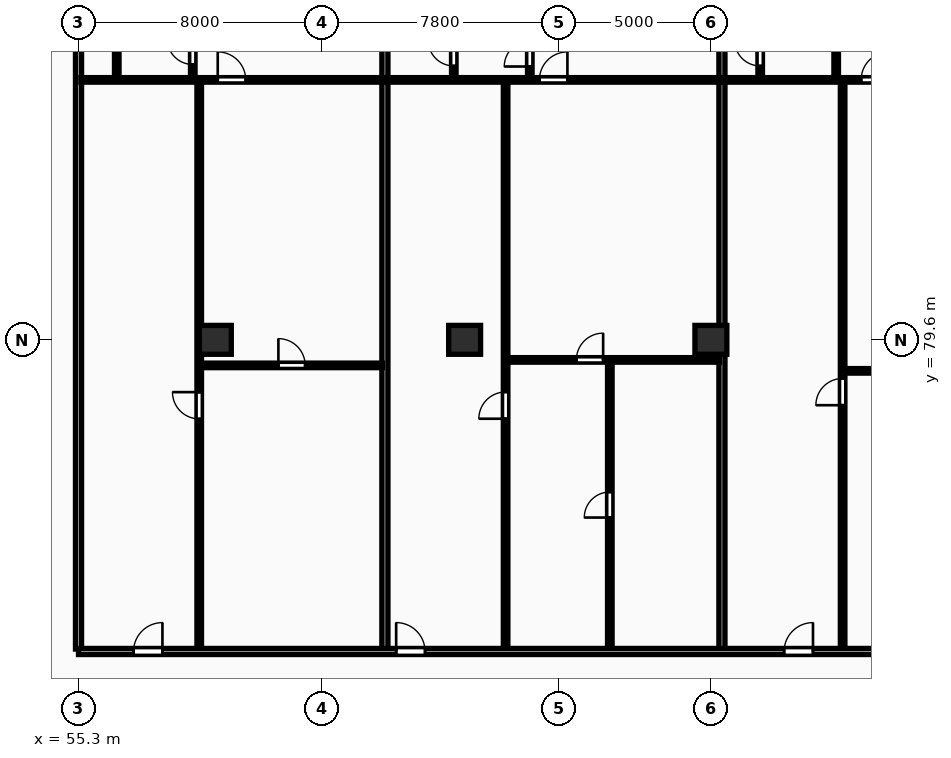
"""IFC4 building model, lengths in metres.
Left out: names, types, materials, properties, quantities, classifications, styles, units other than length and angle.
Written with IfcOpenShell. Run it as: python <this file> out.ifc"""

import sys

from ifc_helpers import new_model, si_unit, direction, frame, frame_2d, origin, origin_2d, place, context, subcontext, project, spatial, rectangle, extrude, element, fill, save


model = new_model("IFC4")
c1 = context("Model", 3, precision=1e-05, world=origin(), true_north=direction((0.0, 1.0)))
c2 = subcontext(c1, "Body", "Model", "MODEL_VIEW")
j1 = project(units=[si_unit("LENGTHUNIT", "METRE"), si_unit("PLANEANGLEUNIT", "RADIAN")], contexts=[c1])
p1 = place(None, origin())
s1 = spatial("IfcSite", under=j1, at=p1, CompositionType="ELEMENT")
p2 = place(p1, origin())
s2 = spatial("IfcBuilding", under=s1, at=p2, CompositionType="ELEMENT")
p3 = place(p2, frame((0.0, 0.0, 24.0)))
s3 = spatial("IfcBuildingStorey", under=s2, at=p3, CompositionType="ELEMENT", Elevation=24.0)
for number, where, z_axis, x_axis in (
    (1, (59.8, 79.6, 0.0), (0.0, 0.0, 1.0), (1.0, 0.0, 0.0)),
    (2, (68.0, 79.6, 0.0), (0.0, 0.0, 1.0), (1.0, 0.0, 0.0)),
    (3, (76.1, 79.6, 0.0), (0.0, 0.0, 1.0), (1.0, 0.0, 0.0)),
):
    element("IfcColumn", number, at=place(p3, frame(where, z_axis=z_axis, x_axis=x_axis)), inside=s3, PredefinedType="COLUMN", context=c2, shape_type="SweptSolid", body=[
        extrude(rectangle(XDim=1.05, YDim=0.95, at=origin_2d()), origin(), (0.0, 0.0, 1.0), 3.25),
    ])
for number, where, z_axis, x_axis in (
    (4, (55.3, 69.43, 0.0), (0.0, 0.0, 1.0), (0.0, 1.0, 0.0)),
    (5, (65.378, 69.43, 0.0), (0.0, 0.0, 1.0), (0.0, 1.0, 0.0)),
):
    element("IfcWall", number, at=place(p3, frame(where, z_axis=z_axis, x_axis=x_axis)), inside=s3, PredefinedType="PARTITIONING", context=c2, shape_type="SweptSolid", body=[
        extrude(rectangle(XDim=29.07, YDim=0.2, at=frame_2d((14.535, 0.0))), origin(), (0.0, 0.0, 1.0), 2.97),
    ])
p4 = place(p3, frame((59.33, 78.76, 0.0), z_axis=(0.0, 0.0, 1.0), x_axis=(1.0, 0.0, 0.0)))
e6 = element("IfcWall", 6, at=p4, inside=s3, PredefinedType="PARTITIONING", context=c2, shape_type="SweptSolid", body=[
    extrude(rectangle(XDim=5.968, YDim=0.15, at=frame_2d((2.984, 0.0))), origin(), (0.0, 0.0, 1.0), 2.97),
])
p5 = place(p4, frame((2.544, 0.0, 0.0)))
e7 = element("IfcOpeningElement", 7, at=p5, cuts=e6, PredefinedType="OPENING", context=c2, shape_type="SweptSolid", body=[
    extrude(rectangle(XDim=0.88, YDim=2.06, at=frame_2d((0.44, 1.03))), frame((0.0, 0.085, 0.0), z_axis=(0.0, -1.0, 0.0), x_axis=(1.0, 0.0, 0.0)), (0.0, 0.0, 1.0), 0.17),
])
p6 = place(p3, frame((59.27, 69.41, 0.0), z_axis=(0.0, 0.0, 1.0), x_axis=(0.0, 1.0, 0.0)))
e8 = element("IfcWall", 8, at=p6, inside=s3, PredefinedType="PARTITIONING", context=c2, shape_type="SweptSolid", body=[
    extrude(rectangle(XDim=18.7, YDim=0.15, at=frame_2d((9.35, 0.0))), origin(), (0.0, 0.0, 1.0), 2.97),
])
p7 = place(p6, frame((7.59, 0.0, 0.0)))
e9 = element("IfcOpeningElement", 9, at=p7, cuts=e8, PredefinedType="OPENING", context=c2, shape_type="SweptSolid", body=[
    extrude(rectangle(XDim=0.88, YDim=2.06, at=frame_2d((0.44, 1.03))), frame((0.0, 0.085, 0.0), z_axis=(0.0, -1.0, 0.0), x_axis=(1.0, 0.0, 0.0)), (0.0, 0.0, 1.0), 0.17),
])
p8 = place(p3, frame((56.558, 88.19, 0.0), z_axis=(0.0, 0.0, 1.0), x_axis=(0.0, 1.0, 0.0)))
e10 = element("IfcWall", 10, at=p8, inside=s3, PredefinedType="PARTITIONING", context=c2, shape_type="SweptSolid", body=[
    extrude(rectangle(XDim=5.0, YDim=0.15, at=frame_2d((2.5, 0.0))), origin(), (0.0, 0.0, 1.0), 2.97),
])
p9 = place(p8, frame((2.08, 0.0, 0.0)))
e11 = element("IfcOpeningElement", 11, at=p9, cuts=e10, PredefinedType="OPENING", context=c2, shape_type="SweptSolid", body=[
    extrude(rectangle(XDim=0.84, YDim=2.04, at=frame_2d((0.42, 1.02))), frame((0.0, 0.085, 0.0), z_axis=(0.0, -1.0, 0.0), x_axis=(1.0, 0.0, 0.0)), (0.0, 0.0, 1.0), 0.17),
])
p10 = place(p3, frame((59.058, 88.19, 0.0), z_axis=(0.0, 0.0, 1.0), x_axis=(0.0, 1.0, 0.0)))
e12 = element("IfcWall", 12, at=p10, inside=s3, PredefinedType="PARTITIONING", context=c2, shape_type="SweptSolid", body=[
    extrude(rectangle(XDim=5.0, YDim=0.15, at=frame_2d((2.5, 0.0))), origin(), (0.0, 0.0, 1.0), 2.97),
])
p11 = place(p10, frame((0.467, 0.0, 0.0)))
e13 = element("IfcOpeningElement", 13, at=p11, cuts=e12, PredefinedType="OPENING", context=c2, shape_type="SweptSolid", body=[
    extrude(rectangle(XDim=0.84, YDim=2.04, at=frame_2d((0.42, 1.02))), frame((0.0, 0.085, 0.0), z_axis=(0.0, -1.0, 0.0), x_axis=(1.0, 0.0, 0.0)), (0.0, 0.0, 1.0), 0.17),
])
p12 = place(p3, frame((55.38, 88.15, 0.0), z_axis=(0.0, 0.0, 1.0), x_axis=(1.0, 0.0, 0.0)))
e14 = element("IfcWall", 14, at=p12, inside=s3, PredefinedType="PARTITIONING", context=c2, shape_type="SweptSolid", body=[
    extrude(rectangle(XDim=9.918, YDim=0.15, at=frame_2d((4.959, 0.0))), origin(), (0.0, 0.0, 1.0), 2.97),
])
p13 = place(p12, frame((4.499, 0.0, 0.0)))
e15 = element("IfcOpeningElement", 15, at=p13, cuts=e14, PredefinedType="OPENING", context=c2, shape_type="SweptSolid", body=[
    extrude(rectangle(XDim=0.92, YDim=2.08, at=frame_2d((0.46, 1.04))), frame((0.0, 0.085, 0.0), z_axis=(0.0, -1.0, 0.0), x_axis=(1.0, 0.0, 0.0)), (0.0, 0.0, 1.0), 0.17),
])
p14 = place(p3, frame((76.464, 69.43, 0.0), z_axis=(0.0, 0.0, 1.0), x_axis=(0.0, 1.0, 0.0)))
e16 = element("IfcWall", 16, at=p14, inside=s3, PredefinedType="PARTITIONING", context=c2, shape_type="SweptSolid", body=[
    extrude(rectangle(XDim=29.07, YDim=0.2, at=frame_2d((14.535, 0.0))), origin(), (0.0, 0.0, 1.0), 2.22),
])
p15 = place(p3, frame((72.776, 69.41, 0.0), z_axis=(0.0, 0.0, 1.0), x_axis=(0.0, 1.0, 0.0)))
e17 = element("IfcWall", 17, at=p15, inside=s3, PredefinedType="PARTITIONING", context=c2, shape_type="SweptSolid", body=[
    extrude(rectangle(XDim=9.53, YDim=0.15, at=frame_2d((4.765, 0.0))), origin(), (0.0, 0.0, 1.0), 2.97),
])
p16 = place(p15, frame((4.345, 0.0, 0.0)))
e18 = element("IfcOpeningElement", 18, at=p16, cuts=e17, PredefinedType="OPENING", context=c2, shape_type="SweptSolid", body=[
    extrude(rectangle(XDim=0.84, YDim=2.04, at=frame_2d((0.42, 1.02))), frame((0.0, 0.085, 0.0), z_axis=(0.0, -1.0, 0.0), x_axis=(1.0, 0.0, 0.0)), (0.0, 0.0, 1.0), 0.17),
])
p17 = place(p3, frame((69.408, 78.94, 0.0), z_axis=(0.0, 0.0, 1.0), x_axis=(1.0, 0.0, 0.0)))
e19 = element("IfcWall", 19, at=p17, inside=s3, PredefinedType="PARTITIONING", context=c2, shape_type="SweptSolid", body=[
    extrude(rectangle(XDim=6.976, YDim=0.15, at=frame_2d((3.488, 0.0))), origin(), (0.0, 0.0, 1.0), 2.97),
])
p18 = place(p17, frame((2.268, 0.0, 0.0)))
e20 = element("IfcOpeningElement", 20, at=p18, cuts=e19, PredefinedType="OPENING", context=c2, shape_type="SweptSolid", body=[
    extrude(rectangle(XDim=0.88, YDim=2.06, at=frame_2d((0.44, 1.03))), frame((0.0, 0.085, 0.0), z_axis=(0.0, -1.0, 0.0), x_axis=(1.0, 0.0, 0.0)), (0.0, 0.0, 1.0), 0.17),
])
p19 = place(p3, frame((69.348, 69.41, 0.0), z_axis=(0.0, 0.0, 1.0), x_axis=(0.0, 1.0, 0.0)))
e21 = element("IfcWall", 21, at=p19, inside=s3, PredefinedType="PARTITIONING", context=c2, shape_type="SweptSolid", body=[
    extrude(rectangle(XDim=18.7, YDim=0.15, at=frame_2d((9.35, 0.0))), origin(), (0.0, 0.0, 1.0), 2.97),
])
p20 = place(p19, frame((7.595, 0.0, 0.0)))
e22 = element("IfcOpeningElement", 22, at=p20, cuts=e21, PredefinedType="OPENING", context=c2, shape_type="SweptSolid", body=[
    extrude(rectangle(XDim=0.88, YDim=2.06, at=frame_2d((0.44, 1.03))), frame((0.0, 0.085, 0.0), z_axis=(0.0, -1.0, 0.0), x_axis=(1.0, 0.0, 0.0)), (0.0, 0.0, 1.0), 0.17),
])
p21 = place(p3, frame((67.644, 88.19, 0.0), z_axis=(0.0, 0.0, 1.0), x_axis=(0.0, 1.0, 0.0)))
e23 = element("IfcWall", 23, at=p21, inside=s3, PredefinedType="PARTITIONING", context=c2, shape_type="SweptSolid", body=[
    extrude(rectangle(XDim=5.0, YDim=0.15, at=frame_2d((2.5, 0.0))), origin(), (0.0, 0.0, 1.0), 2.22),
])
p22 = place(p21, frame((0.419, 0.0, 0.0)))
e24 = element("IfcOpeningElement", 24, at=p22, cuts=e23, PredefinedType="OPENING", context=c2, shape_type="SweptSolid", body=[
    extrude(rectangle(XDim=0.84, YDim=2.04, at=frame_2d((0.42, 1.02))), frame((0.0, 0.085, 0.0), z_axis=(0.0, -1.0, 0.0), x_axis=(1.0, 0.0, 0.0)), (0.0, 0.0, 1.0), 0.17),
])
p23 = place(p3, frame((70.144, 88.19, 0.0), z_axis=(0.0, 0.0, 1.0), x_axis=(0.0, 1.0, 0.0)))
e25 = element("IfcWall", 25, at=p23, inside=s3, PredefinedType="PARTITIONING", context=c2, shape_type="SweptSolid", body=[
    extrude(rectangle(XDim=5.0, YDim=0.15, at=frame_2d((2.5, 0.0))), origin(), (0.0, 0.0, 1.0), 2.97),
])
p24 = place(p23, frame((0.4, 0.0, 0.0)))
e26 = element("IfcOpeningElement", 26, at=p24, cuts=e25, PredefinedType="OPENING", context=c2, shape_type="SweptSolid", body=[
    extrude(rectangle(XDim=0.84, YDim=2.04, at=frame_2d((0.42, 1.02))), frame((0.0, 0.085, 0.0), z_axis=(0.0, -1.0, 0.0), x_axis=(1.0, 0.0, 0.0)), (0.0, 0.0, 1.0), 0.17),
])
p25 = place(p3, frame((65.458, 88.15, 0.0), z_axis=(0.0, 0.0, 1.0), x_axis=(1.0, 0.0, 0.0)))
e27 = element("IfcWall", 27, at=p25, inside=s3, PredefinedType="PARTITIONING", context=c2, shape_type="SweptSolid", body=[
    extrude(rectangle(XDim=10.926, YDim=0.15, at=frame_2d((5.463, 0.0))), origin(), (0.0, 0.0, 1.0), 2.97),
])
p26 = place(p25, frame((5.003, 0.0, 0.0)))
e28 = element("IfcOpeningElement", 28, at=p26, cuts=e27, PredefinedType="OPENING", context=c2, shape_type="SweptSolid", body=[
    extrude(rectangle(XDim=0.92, YDim=2.08, at=frame_2d((0.46, 1.04))), frame((0.0, 0.085, 0.0), z_axis=(0.0, -1.0, 0.0), x_axis=(1.0, 0.0, 0.0)), (0.0, 0.0, 1.0), 0.17),
])
p27 = place(p3, frame((80.494, 78.58, 0.0), z_axis=(0.0, 0.0, 1.0), x_axis=(1.0, 0.0, 0.0)))
e29 = element("IfcWall", 29, at=p27, inside=s3, PredefinedType="PARTITIONING", context=c2, shape_type="SweptSolid", body=[
    extrude(rectangle(XDim=5.968, YDim=0.15, at=frame_2d((2.984, 0.0))), origin(), (0.0, 0.0, 1.0), 2.97),
])
p28 = place(p27, frame((1.403, 0.0, 0.0)))
e30 = element("IfcOpeningElement", 30, at=p28, cuts=e29, PredefinedType="OPENING", context=c2, shape_type="SweptSolid", body=[
    extrude(rectangle(XDim=0.88, YDim=2.06, at=frame_2d((0.44, 1.03))), frame((0.0, 0.085, 0.0), z_axis=(0.0, -1.0, 0.0), x_axis=(1.0, 0.0, 0.0)), (0.0, 0.0, 1.0), 0.17),
])
p29 = place(p3, frame((80.434, 69.41, 0.0), z_axis=(0.0, 0.0, 1.0), x_axis=(0.0, 1.0, 0.0)))
e31 = element("IfcWall", 31, at=p29, inside=s3, PredefinedType="PARTITIONING", context=c2, shape_type="SweptSolid", body=[
    extrude(rectangle(XDim=18.7, YDim=0.15, at=frame_2d((9.35, 0.0))), origin(), (0.0, 0.0, 1.0), 2.97),
])
p30 = place(p29, frame((8.04, 0.0, 0.0)))
e32 = element("IfcOpeningElement", 32, at=p30, cuts=e31, PredefinedType="OPENING", context=c2, shape_type="SweptSolid", body=[
    extrude(rectangle(XDim=0.88, YDim=2.06, at=frame_2d((0.44, 1.03))), frame((0.0, 0.085, 0.0), z_axis=(0.0, -1.0, 0.0), x_axis=(1.0, 0.0, 0.0)), (0.0, 0.0, 1.0), 0.17),
])
p31 = place(p3, frame((77.721, 88.19, 0.0), z_axis=(0.0, 0.0, 1.0), x_axis=(0.0, 1.0, 0.0)))
e33 = element("IfcWall", 33, at=p31, inside=s3, PredefinedType="PARTITIONING", context=c2, shape_type="SweptSolid", body=[
    extrude(rectangle(XDim=5.0, YDim=0.15, at=frame_2d((2.5, 0.0))), origin(), (0.0, 0.0, 1.0), 2.97),
])
p32 = place(p31, frame((0.419, 0.0, 0.0)))
e34 = element("IfcOpeningElement", 34, at=p32, cuts=e33, PredefinedType="OPENING", context=c2, shape_type="SweptSolid", body=[
    extrude(rectangle(XDim=0.84, YDim=2.04, at=frame_2d((0.42, 1.02))), frame((0.0, 0.085, 0.0), z_axis=(0.0, -1.0, 0.0), x_axis=(1.0, 0.0, 0.0)), (0.0, 0.0, 1.0), 0.17),
])
p33 = place(p3, frame((80.221, 88.19, 0.0), z_axis=(0.0, 0.0, 1.0), x_axis=(0.0, 1.0, 0.0)))
e35 = element("IfcWall", 35, at=p33, inside=s3, PredefinedType="PARTITIONING", context=c2, shape_type="SweptSolid", body=[
    extrude(rectangle(XDim=5.0, YDim=0.15, at=frame_2d((2.5, 0.0))), origin(), (0.0, 0.0, 1.0), 2.97),
])
p34 = place(p33, frame((2.08, 0.0, 0.0)))
e36 = element("IfcOpeningElement", 36, at=p34, cuts=e35, PredefinedType="OPENING", context=c2, shape_type="SweptSolid", body=[
    extrude(rectangle(XDim=0.84, YDim=2.04, at=frame_2d((0.42, 1.02))), frame((0.0, 0.085, 0.0), z_axis=(0.0, -1.0, 0.0), x_axis=(1.0, 0.0, 0.0)), (0.0, 0.0, 1.0), 0.17),
])
p35 = place(p3, frame((76.544, 88.15, 0.0), z_axis=(0.0, 0.0, 1.0), x_axis=(1.0, 0.0, 0.0)))
e37 = element("IfcWall", 37, at=p35, inside=s3, PredefinedType="PARTITIONING", context=c2, shape_type="SweptSolid", body=[
    extrude(rectangle(XDim=9.918, YDim=0.15, at=frame_2d((4.959, 0.0))), origin(), (0.0, 0.0, 1.0), 2.97),
])
p36 = place(p35, frame((4.499, 0.0, 0.0)))
e38 = element("IfcOpeningElement", 38, at=p36, cuts=e37, PredefinedType="OPENING", context=c2, shape_type="SweptSolid", body=[
    extrude(rectangle(XDim=0.92, YDim=2.08, at=frame_2d((0.46, 1.04))), frame((0.0, 0.085, 0.0), z_axis=(0.0, -1.0, 0.0), x_axis=(1.0, 0.0, 0.0)), (0.0, 0.0, 1.0), 0.17),
])
p37 = place(p3, frame((55.3, 69.35, 0.0), z_axis=(0.0, 0.0, 1.0), x_axis=(1.0, 0.0, 0.0)))
e39 = element("IfcWall", 39, at=p37, inside=s3, PredefinedType="PARTITIONING", context=c2, shape_type="SweptSolid", body=[
    extrude(rectangle(XDim=77.6, YDim=0.2, at=frame_2d((38.8, 0.0))), origin(), (0.0, 0.0, 1.0), 2.97),
])
p38 = place(p37, frame((1.81, 0.0, 0.0)))
e40 = element("IfcOpeningElement", 40, at=p38, cuts=e39, PredefinedType="OPENING", context=c2, shape_type="SweptSolid", body=[
    extrude(rectangle(XDim=0.95, YDim=2.15, at=frame_2d((0.475, 1.075))), frame((0.0, 0.11, 0.0), z_axis=(0.0, -1.0, 0.0), x_axis=(1.0, 0.0, 0.0)), (0.0, 0.0, 1.0), 0.22),
])
p39 = place(p37, frame((10.448, 0.0, 0.0)))
e41 = element("IfcOpeningElement", 41, at=p39, cuts=e39, PredefinedType="OPENING", context=c2, shape_type="SweptSolid", body=[
    extrude(rectangle(XDim=0.95, YDim=2.15, at=frame_2d((0.475, 1.075))), frame((0.0, 0.11, 0.0), z_axis=(0.0, -1.0, 0.0), x_axis=(1.0, 0.0, 0.0)), (0.0, 0.0, 1.0), 0.22),
])
p40 = place(p37, frame((23.208, 0.0, 0.0)))
e42 = element("IfcOpeningElement", 42, at=p40, cuts=e39, PredefinedType="OPENING", context=c2, shape_type="SweptSolid", body=[
    extrude(rectangle(XDim=0.95, YDim=2.15, at=frame_2d((0.475, 1.075))), frame((0.0, 0.11, 0.0), z_axis=(0.0, -1.0, 0.0), x_axis=(1.0, 0.0, 0.0)), (0.0, 0.0, 1.0), 0.22),
])
p41 = place(p37, frame((33.287, 0.0, 0.0)))
e43 = element("IfcOpeningElement", 43, at=p41, cuts=e39, PredefinedType="OPENING", context=c2, shape_type="SweptSolid", body=[
    extrude(rectangle(XDim=0.95, YDim=2.15, at=frame_2d((0.475, 1.075))), frame((0.0, 0.11, 0.0), z_axis=(0.0, -1.0, 0.0), x_axis=(1.0, 0.0, 0.0)), (0.0, 0.0, 1.0), 0.22),
])
p42 = place(p37, frame((44.905, 0.0, 0.0)))
e44 = element("IfcOpeningElement", 44, at=p42, cuts=e39, PredefinedType="OPENING", context=c2, shape_type="SweptSolid", body=[
    extrude(rectangle(XDim=0.95, YDim=2.15, at=frame_2d((0.475, 1.075))), frame((0.0, 0.11, 0.0), z_axis=(0.0, -1.0, 0.0), x_axis=(1.0, 0.0, 0.0)), (0.0, 0.0, 1.0), 0.22),
])
p43 = place(p37, frame((54.119, 0.0, 0.0)))
e45 = element("IfcOpeningElement", 45, at=p43, cuts=e39, PredefinedType="OPENING", context=c2, shape_type="SweptSolid", body=[
    extrude(rectangle(XDim=0.95, YDim=2.15, at=frame_2d((0.475, 1.075))), frame((0.0, 0.11, 0.0), z_axis=(0.0, -1.0, 0.0), x_axis=(1.0, 0.0, 0.0)), (0.0, 0.0, 1.0), 0.22),
])
p44 = place(p37, frame((66.74, 0.0, 0.0)))
e46 = element("IfcOpeningElement", 46, at=p44, cuts=e39, PredefinedType="OPENING", context=c2, shape_type="SweptSolid", body=[
    extrude(rectangle(XDim=0.95, YDim=2.15, at=frame_2d((0.475, 1.075))), frame((0.0, 0.11, 0.0), z_axis=(0.0, -1.0, 0.0), x_axis=(1.0, 0.0, 0.0)), (0.0, 0.0, 1.0), 0.22),
])
p45 = place(p5, origin())
e47 = element("IfcDoor", 47, at=p45, inside=s3, OperationType="SINGLE_SWING_LEFT", PredefinedType="DOOR", context=c2, shape_type="SweptSolid", body=[
    extrude(rectangle(XDim=0.88, YDim=2.06, at=frame_2d((0.44, 1.03))), frame((0.0, 0.025, 0.0), z_axis=(0.0, -1.0, 0.0), x_axis=(1.0, 0.0, 0.0)), (0.0, 0.0, 1.0), 0.05),
])
fill(e7, e47)
p46 = place(p7, origin())
e48 = element("IfcDoor", 48, at=p46, inside=s3, OperationType="SINGLE_SWING_RIGHT", PredefinedType="DOOR", context=c2, shape_type="SweptSolid", body=[
    extrude(rectangle(XDim=0.88, YDim=2.06, at=frame_2d((0.44, 1.03))), frame((0.0, 0.025, 0.0), z_axis=(0.0, -1.0, 0.0), x_axis=(1.0, 0.0, 0.0)), (0.0, 0.0, 1.0), 0.05),
])
fill(e9, e48)
p47 = place(p11, origin())
e49 = element("IfcDoor", 49, at=p47, inside=s3, OperationType="SINGLE_SWING_RIGHT", PredefinedType="DOOR", context=c2, shape_type="SweptSolid", body=[
    extrude(rectangle(XDim=0.84, YDim=2.04, at=frame_2d((0.42, 1.02))), frame((0.0, 0.025, 0.0), z_axis=(0.0, -1.0, 0.0), x_axis=(1.0, 0.0, 0.0)), (0.0, 0.0, 1.0), 0.05),
])
fill(e13, e49)
p48 = place(p13, origin())
e50 = element("IfcDoor", 50, at=p48, inside=s3, OperationType="SINGLE_SWING_LEFT", PredefinedType="DOOR", context=c2, shape_type="SweptSolid", body=[
    extrude(rectangle(XDim=0.92, YDim=2.08, at=frame_2d((0.46, 1.04))), frame((0.0, 0.025, 0.0), z_axis=(0.0, -1.0, 0.0), x_axis=(1.0, 0.0, 0.0)), (0.0, 0.0, 1.0), 0.05),
])
fill(e15, e50)
p49 = place(p16, origin())
e51 = element("IfcDoor", 51, at=p49, inside=s3, OperationType="SINGLE_SWING_LEFT", PredefinedType="DOOR", context=c2, shape_type="SweptSolid", body=[
    extrude(rectangle(XDim=0.84, YDim=2.04, at=frame_2d((0.42, 1.02))), frame((0.0, 0.025, 0.0), z_axis=(0.0, -1.0, 0.0), x_axis=(1.0, 0.0, 0.0)), (0.0, 0.0, 1.0), 0.05),
])
fill(e18, e51)
p50 = place(p18, origin())
e52 = element("IfcDoor", 52, at=p50, inside=s3, OperationType="SINGLE_SWING_RIGHT", PredefinedType="DOOR", context=c2, shape_type="SweptSolid", body=[
    extrude(rectangle(XDim=0.88, YDim=2.06, at=frame_2d((0.44, 1.03))), frame((0.0, 0.025, 0.0), z_axis=(0.0, -1.0, 0.0), x_axis=(1.0, 0.0, 0.0)), (0.0, 0.0, 1.0), 0.05),
])
fill(e20, e52)
p51 = place(p20, origin())
e53 = element("IfcDoor", 53, at=p51, inside=s3, OperationType="SINGLE_SWING_LEFT", PredefinedType="DOOR", context=c2, shape_type="SweptSolid", body=[
    extrude(rectangle(XDim=0.88, YDim=2.06, at=frame_2d((0.44, 1.03))), frame((0.0, 0.025, 0.0), z_axis=(0.0, -1.0, 0.0), x_axis=(1.0, 0.0, 0.0)), (0.0, 0.0, 1.0), 0.05),
])
fill(e22, e53)
p52 = place(p22, origin())
e54 = element("IfcDoor", 54, at=p52, inside=s3, OperationType="SINGLE_SWING_RIGHT", PredefinedType="DOOR", context=c2, shape_type="SweptSolid", body=[
    extrude(rectangle(XDim=0.84, YDim=2.04, at=frame_2d((0.42, 1.02))), frame((0.0, 0.025, 0.0), z_axis=(0.0, -1.0, 0.0), x_axis=(1.0, 0.0, 0.0)), (0.0, 0.0, 1.0), 0.05),
])
fill(e24, e54)
p53 = place(p24, origin())
e55 = element("IfcDoor", 55, at=p53, inside=s3, OperationType="SINGLE_SWING_LEFT", PredefinedType="DOOR", context=c2, shape_type="SweptSolid", body=[
    extrude(rectangle(XDim=0.84, YDim=2.04, at=frame_2d((0.42, 1.02))), frame((0.0, 0.025, 0.0), z_axis=(0.0, -1.0, 0.0), x_axis=(1.0, 0.0, 0.0)), (0.0, 0.0, 1.0), 0.05),
])
fill(e26, e55)
p54 = place(p26, origin())
e56 = element("IfcDoor", 56, at=p54, inside=s3, OperationType="SINGLE_SWING_RIGHT", PredefinedType="DOOR", context=c2, shape_type="SweptSolid", body=[
    extrude(rectangle(XDim=0.92, YDim=2.08, at=frame_2d((0.46, 1.04))), frame((0.0, 0.025, 0.0), z_axis=(0.0, -1.0, 0.0), x_axis=(1.0, 0.0, 0.0)), (0.0, 0.0, 1.0), 0.05),
])
fill(e28, e56)
p55 = place(p30, origin())
e57 = element("IfcDoor", 57, at=p55, inside=s3, OperationType="SINGLE_SWING_LEFT", PredefinedType="DOOR", context=c2, shape_type="SweptSolid", body=[
    extrude(rectangle(XDim=0.88, YDim=2.06, at=frame_2d((0.44, 1.03))), frame((0.0, 0.025, 0.0), z_axis=(0.0, -1.0, 0.0), x_axis=(1.0, 0.0, 0.0)), (0.0, 0.0, 1.0), 0.05),
])
fill(e32, e57)
p56 = place(p32, origin())
e58 = element("IfcDoor", 58, at=p56, inside=s3, OperationType="SINGLE_SWING_RIGHT", PredefinedType="DOOR", context=c2, shape_type="SweptSolid", body=[
    extrude(rectangle(XDim=0.84, YDim=2.04, at=frame_2d((0.42, 1.02))), frame((0.0, 0.025, 0.0), z_axis=(0.0, -1.0, 0.0), x_axis=(1.0, 0.0, 0.0)), (0.0, 0.0, 1.0), 0.05),
])
fill(e34, e58)
p57 = place(p36, origin())
e59 = element("IfcDoor", 59, at=p57, inside=s3, OperationType="SINGLE_SWING_RIGHT", PredefinedType="DOOR", context=c2, shape_type="SweptSolid", body=[
    extrude(rectangle(XDim=0.92, YDim=2.08, at=frame_2d((0.46, 1.04))), frame((0.0, 0.025, 0.0), z_axis=(0.0, -1.0, 0.0), x_axis=(1.0, 0.0, 0.0)), (0.0, 0.0, 1.0), 0.05),
])
fill(e38, e59)
p58 = place(p38, origin())
e60 = element("IfcDoor", 60, at=p58, inside=s3, OperationType="SINGLE_SWING_RIGHT", PredefinedType="DOOR", context=c2, shape_type="SweptSolid", body=[
    extrude(rectangle(XDim=0.95, YDim=2.15, at=frame_2d((0.475, 1.075))), frame((0.0, 0.025, 0.0), z_axis=(0.0, -1.0, 0.0), x_axis=(1.0, 0.0, 0.0)), (0.0, 0.0, 1.0), 0.05),
])
fill(e40, e60)
p59 = place(p39, origin())
e61 = element("IfcDoor", 61, at=p59, inside=s3, OperationType="SINGLE_SWING_LEFT", PredefinedType="DOOR", context=c2, shape_type="SweptSolid", body=[
    extrude(rectangle(XDim=0.95, YDim=2.15, at=frame_2d((0.475, 1.075))), frame((0.0, 0.025, 0.0), z_axis=(0.0, -1.0, 0.0), x_axis=(1.0, 0.0, 0.0)), (0.0, 0.0, 1.0), 0.05),
])
fill(e41, e61)
p60 = place(p40, origin())
e62 = element("IfcDoor", 62, at=p60, inside=s3, OperationType="SINGLE_SWING_RIGHT", PredefinedType="DOOR", context=c2, shape_type="SweptSolid", body=[
    extrude(rectangle(XDim=0.95, YDim=2.15, at=frame_2d((0.475, 1.075))), frame((0.0, 0.025, 0.0), z_axis=(0.0, -1.0, 0.0), x_axis=(1.0, 0.0, 0.0)), (0.0, 0.0, 1.0), 0.05),
])
fill(e42, e62)
save(model, sys.argv[1])
